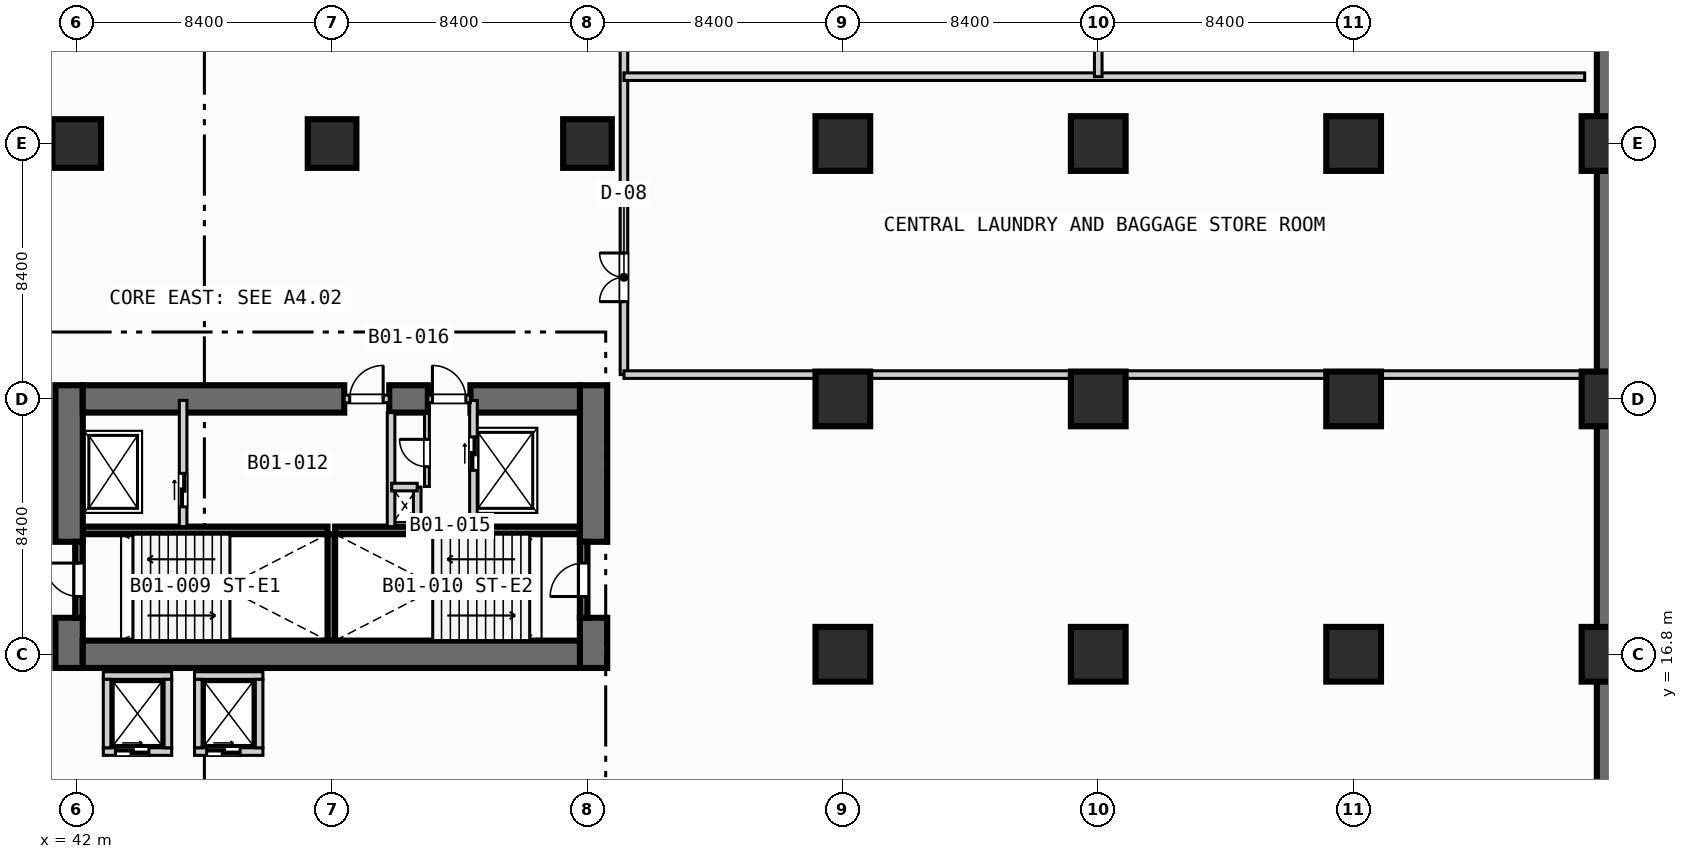
"""IFC4 building model, lengths in metres.
Left out: names, types, materials, properties, quantities, classifications, styles, units other than length and angle.
Written with IfcOpenShell. Run it as: python <this file> out.ifc"""

import sys

from ifc_helpers import new_model, si_unit, direction, frame, frame_2d, origin, origin_2d, place, context, subcontext, project, spatial, rectangle, extrude, element, fill, save


model = new_model("IFC4")
c1 = context("Model", 3, precision=1e-05, world=origin(), true_north=direction((0.0, 1.0)))
c2 = subcontext(c1, "Body", "Model", "MODEL_VIEW")
j1 = project(units=[si_unit("LENGTHUNIT", "METRE"), si_unit("PLANEANGLEUNIT", "RADIAN")], contexts=[c1])
p1 = place(None, origin())
s1 = spatial("IfcSite", under=j1, at=p1, CompositionType="ELEMENT")
p2 = place(p1, origin())
s2 = spatial("IfcBuilding", under=s1, at=p2, CompositionType="ELEMENT")
p3 = place(p2, frame((0.0, 0.0, -4.2)))
s3 = spatial("IfcBuildingStorey", under=s2, at=p3, CompositionType="ELEMENT", Elevation=-4.2)
p4 = place(p3, frame((92.4, 0.4, 0.0), z_axis=(0.0, 0.0, 1.0), x_axis=(0.0, 1.0, 0.0)))
e1 = element("IfcWall", 1, at=p4, inside=s3, PredefinedType="USERDEFINED", context=c2, shape_type="SweptSolid", body=[
    extrude(rectangle(XDim=91.6, YDim=0.8, at=frame_2d((45.8, 0.0))), origin(), (0.0, 0.0, 1.0), 3.62),
])
for number, where, z_axis, x_axis in (
    (2, (42.2, 20.875, 0.0), (0.0, 0.0, 1.0), (1.0, 0.0, 0.0)),
    (3, (50.5, 20.875, 0.0), (0.0, 0.0, 1.0), (1.0, 0.0, 0.0)),
):
    element("IfcWall", number, at=place(p3, frame(where, z_axis=z_axis, x_axis=x_axis)), inside=s3, PredefinedType="SOLIDWALL", context=c2, shape_type="SweptSolid", body=[
        extrude(rectangle(XDim=8.05, YDim=0.25, at=frame_2d((4.025, 0.0))), origin(), (0.0, 0.0, 1.0), 3.85),
    ])
p5 = place(p3, frame((50.375, 17.25, 0.0), z_axis=(0.0, 0.0, 1.0), x_axis=(0.0, 1.0, 0.0)))
e4 = element("IfcWall", 4, at=p5, inside=s3, PredefinedType="SOLIDWALL", context=c2, shape_type="SweptSolid", body=[
    extrude(rectangle(XDim=3.5, YDim=0.25, at=frame_2d((1.75, 0.0))), origin(), (0.0, 0.0, 1.0), 3.85),
])
p6 = place(p3, frame((41.75, 16.35, 0.0), z_axis=(0.0, 0.0, 1.0), x_axis=(0.0, 1.0, 0.0)))
e5 = element("IfcWall", 5, at=p6, inside=s3, PredefinedType="SHEAR", context=c2, shape_type="SweptSolid", body=[
    extrude(rectangle(XDim=1.65, YDim=0.9, at=frame_2d((0.825, 0.0))), origin(), (0.0, 0.0, 1.0), 3.85),
])
p7 = place(p3, frame((41.75, 20.5, 0.0), z_axis=(0.0, 0.0, 1.0), x_axis=(0.0, 1.0, 0.0)))
e6 = element("IfcWall", 6, at=p7, inside=s3, PredefinedType="SHEAR", context=c2, shape_type="SweptSolid", body=[
    extrude(rectangle(XDim=5.15, YDim=0.9, at=frame_2d((2.575, 0.0))), origin(), (0.0, 0.0, 1.0), 3.85),
])
p8 = place(p3, frame((59.0, 16.35, 0.0), z_axis=(0.0, 0.0, 1.0), x_axis=(0.0, 1.0, 0.0)))
e7 = element("IfcWall", 7, at=p8, inside=s3, PredefinedType="SHEAR", context=c2, shape_type="SweptSolid", body=[
    extrude(rectangle(XDim=1.65, YDim=0.9, at=frame_2d((0.825, 0.0))), origin(), (0.0, 0.0, 1.0), 3.85),
])
p9 = place(p3, frame((59.0, 20.5, 0.0), z_axis=(0.0, 0.0, 1.0), x_axis=(0.0, 1.0, 0.0)))
e8 = element("IfcWall", 8, at=p9, inside=s3, PredefinedType="SHEAR", context=c2, shape_type="SweptSolid", body=[
    extrude(rectangle(XDim=5.15, YDim=0.9, at=frame_2d((2.575, 0.0))), origin(), (0.0, 0.0, 1.0), 3.85),
])
p10 = place(p3, frame((42.2, 16.8, 0.0), z_axis=(0.0, 0.0, 1.0), x_axis=(1.0, 0.0, 0.0)))
e9 = element("IfcWall", 9, at=p10, inside=s3, PredefinedType="SHEAR", context=c2, shape_type="SweptSolid", body=[
    extrude(rectangle(XDim=16.35, YDim=0.9, at=frame_2d((8.175, 0.0))), origin(), (0.0, 0.0, 1.0), 3.85),
])
p11 = place(p3, frame((42.2, 25.2, 0.0), z_axis=(0.0, 0.0, 1.0), x_axis=(1.0, 0.0, 0.0)))
e10 = element("IfcWall", 10, at=p11, inside=s3, PredefinedType="SHEAR", context=c2, shape_type="SweptSolid", body=[
    extrude(rectangle(XDim=8.6, YDim=0.9, at=frame_2d((4.3, 0.0))), origin(), (0.0, 0.0, 1.0), 3.85),
])
p12 = place(p3, frame((52.28, 25.2, 0.0), z_axis=(0.0, 0.0, 1.0), x_axis=(1.0, 0.0, 0.0)))
e11 = element("IfcWall", 11, at=p12, inside=s3, PredefinedType="SHEAR", context=c2, shape_type="SweptSolid", body=[
    extrude(rectangle(XDim=1.27, YDim=0.9, at=frame_2d((0.635, 0.0))), origin(), (0.0, 0.0, 1.0), 3.85),
])
p13 = place(p3, frame((54.95, 25.2, 0.0), z_axis=(0.0, 0.0, 1.0), x_axis=(1.0, 0.0, 0.0)))
e12 = element("IfcWall", 12, at=p13, inside=s3, PredefinedType="SHEAR", context=c2, shape_type="SweptSolid", body=[
    extrude(rectangle(XDim=3.6, YDim=0.9, at=frame_2d((1.8, 0.0))), origin(), (0.0, 0.0, 1.0), 3.85),
])
for number, where, z_axis, x_axis in (
    (13, (42.0, 33.6, 0.0), (0.0, 0.0, 1.0), (1.0, 0.0, 0.0)),
    (14, (50.4, 33.6, 0.0), (0.0, 0.0, 1.0), (1.0, 0.0, 0.0)),
    (15, (58.8, 33.6, 0.0), (0.0, 0.0, 1.0), (1.0, 0.0, 0.0)),
):
    element("IfcColumn", number, at=place(p3, frame(where, z_axis=z_axis, x_axis=x_axis)), inside=s3, PredefinedType="COLUMN", context=c2, shape_type="SweptSolid", body=[
        extrude(rectangle(XDim=1.6, YDim=1.6, at=origin_2d()), origin(), (0.0, 0.0, 1.0), 4.2),
    ])
for number, where, z_axis, x_axis in (
    (16, (67.2, 16.8, 0.0), (0.0, 0.0, 1.0), (1.0, 0.0, 0.0)),
    (17, (67.2, 25.2, 0.0), (0.0, 0.0, 1.0), (1.0, 0.0, 0.0)),
    (18, (67.2, 33.6, 0.0), (0.0, 0.0, 1.0), (1.0, 0.0, 0.0)),
    (19, (75.6, 16.8, 0.0), (0.0, 0.0, 1.0), (1.0, 0.0, 0.0)),
    (20, (75.6, 25.2, 0.0), (0.0, 0.0, 1.0), (1.0, 0.0, 0.0)),
    (21, (75.6, 33.6, 0.0), (0.0, 0.0, 1.0), (1.0, 0.0, 0.0)),
    (22, (84.0, 16.8, 0.0), (0.0, 0.0, 1.0), (1.0, 0.0, 0.0)),
    (23, (84.0, 25.2, 0.0), (0.0, 0.0, 1.0), (1.0, 0.0, 0.0)),
    (24, (84.0, 33.6, 0.0), (0.0, 0.0, 1.0), (1.0, 0.0, 0.0)),
    (25, (92.4, 16.8, 0.0), (0.0, 0.0, 1.0), (1.0, 0.0, 0.0)),
    (26, (92.4, 25.2, 0.0), (0.0, 0.0, 1.0), (1.0, 0.0, 0.0)),
    (27, (92.4, 33.6, 0.0), (0.0, 0.0, 1.0), (1.0, 0.0, 0.0)),
):
    element("IfcColumn", number, at=place(p3, frame(where, z_axis=z_axis, x_axis=x_axis)), inside=s3, PredefinedType="COLUMN", context=c2, shape_type="SweptSolid", body=[
        extrude(rectangle(XDim=1.8, YDim=1.8, at=origin_2d()), origin(), (0.0, 0.0, 1.0), 4.2),
    ])
p14 = place(p3, frame((42.075, 18.0, 0.0), z_axis=(0.0, 0.0, 1.0), x_axis=(0.0, 1.0, 0.0)))
e28 = element("IfcWall", 28, at=p14, inside=s3, PredefinedType="SOLIDWALL", context=c2, shape_type="SweptSolid", body=[
    extrude(rectangle(XDim=2.5, YDim=0.25, at=frame_2d((1.25, 0.0))), origin(), (0.0, 0.0, 1.0), 3.85),
])
p15 = place(p14, frame((0.7, 0.0, 0.0)))
e29 = element("IfcOpeningElement", 29, at=p15, cuts=e28, PredefinedType="OPENING", context=c2, shape_type="SweptSolid", body=[
    extrude(rectangle(XDim=1.1, YDim=2.15, at=frame_2d((0.55, 1.075))), frame((0.0, 0.135, 0.0), z_axis=(0.0, -1.0, 0.0), x_axis=(1.0, 0.0, 0.0)), (0.0, 0.0, 1.0), 0.27),
])
p16 = place(p3, frame((58.675, 18.0, 0.0), z_axis=(0.0, 0.0, 1.0), x_axis=(0.0, 1.0, 0.0)))
e30 = element("IfcWall", 30, at=p16, inside=s3, PredefinedType="SOLIDWALL", context=c2, shape_type="SweptSolid", body=[
    extrude(rectangle(XDim=2.5, YDim=0.25, at=frame_2d((1.25, 0.0))), origin(), (0.0, 0.0, 1.0), 3.85),
])
p17 = place(p16, frame((0.7, 0.0, 0.0)))
e31 = element("IfcOpeningElement", 31, at=p17, cuts=e30, PredefinedType="OPENING", context=c2, shape_type="SweptSolid", body=[
    extrude(rectangle(XDim=1.1, YDim=2.15, at=frame_2d((0.55, 1.075))), frame((0.0, 0.135, 0.0), z_axis=(0.0, -1.0, 0.0), x_axis=(1.0, 0.0, 0.0)), (0.0, 0.0, 1.0), 0.27),
])
p18 = place(p3, frame((45.5, 21.0, 0.0), z_axis=(0.0, 0.0, 1.0), x_axis=(0.0, 1.0, 0.0)))
e32 = element("IfcWall", 32, at=p18, inside=s3, PredefinedType="SOLIDWALL", context=c2, shape_type="SweptSolid", body=[
    extrude(rectangle(XDim=4.15, YDim=0.25, at=frame_2d((2.075, 0.0))), origin(), (0.0, 0.0, 1.0), 3.85),
])
p19 = place(p18, frame((0.65, 0.0, 0.0)))
e33 = element("IfcOpeningElement", 33, at=p19, cuts=e32, PredefinedType="OPENING", context=c2, shape_type="SweptSolid", body=[
    extrude(rectangle(XDim=1.1, YDim=2.15, at=frame_2d((0.55, 1.075))), frame((0.0, 0.135, 0.0), z_axis=(0.0, -1.0, 0.0), x_axis=(1.0, 0.0, 0.0)), (0.0, 0.0, 1.0), 0.27),
])
p20 = place(p3, frame((50.8, 25.2, 0.0), z_axis=(0.0, 0.0, 1.0), x_axis=(1.0, 0.0, 0.0)))
e34 = element("IfcWall", 34, at=p20, inside=s3, PredefinedType="SOLIDWALL", context=c2, shape_type="SweptSolid", body=[
    extrude(rectangle(XDim=1.48, YDim=0.25, at=frame_2d((0.74, 0.0))), origin(), (0.0, 0.0, 1.0), 3.85),
])
p21 = place(p20, frame((0.18, 0.0, 0.0)))
e35 = element("IfcOpeningElement", 35, at=p21, cuts=e34, PredefinedType="OPENING", context=c2, shape_type="SweptSolid", body=[
    extrude(rectangle(XDim=1.1, YDim=2.15, at=frame_2d((0.55, 1.075))), frame((0.0, 0.135, 0.0), z_axis=(0.0, -1.0, 0.0), x_axis=(1.0, 0.0, 0.0)), (0.0, 0.0, 1.0), 0.27),
])
p22 = place(p3, frame((52.34, 21.0, 0.0), z_axis=(0.0, 0.0, 1.0), x_axis=(0.0, 1.0, 0.0)))
e36 = element("IfcWall", 36, at=p22, inside=s3, PredefinedType="SOLIDWALL", context=c2, shape_type="SweptSolid", body=[
    extrude(rectangle(XDim=3.75, YDim=0.25, at=frame_2d((1.875, 0.0))), origin(), (0.0, 0.0, 1.0), 3.85),
])
p23 = place(p3, frame((55.05, 21.0, 0.0), z_axis=(0.0, 0.0, 1.0), x_axis=(0.0, 1.0, 0.0)))
e37 = element("IfcWall", 37, at=p23, inside=s3, PredefinedType="SOLIDWALL", context=c2, shape_type="SweptSolid", body=[
    extrude(rectangle(XDim=4.15, YDim=0.25, at=frame_2d((2.075, 0.0))), origin(), (0.0, 0.0, 1.0), 3.85),
])
p24 = place(p23, frame((1.85, 0.0, 0.0)))
e38 = element("IfcOpeningElement", 38, at=p24, cuts=e37, PredefinedType="OPENING", context=c2, shape_type="SweptSolid", body=[
    extrude(rectangle(XDim=1.1, YDim=2.15, at=frame_2d((0.55, 1.075))), frame((0.0, 0.135, 0.0), z_axis=(0.0, -1.0, 0.0), x_axis=(1.0, 0.0, 0.0)), (0.0, 0.0, 1.0), 0.27),
])
p25 = place(p3, frame((53.55, 25.2, 0.0), z_axis=(0.0, 0.0, 1.0), x_axis=(1.0, 0.0, 0.0)))
e39 = element("IfcWall", 39, at=p25, inside=s3, PredefinedType="SOLIDWALL", context=c2, shape_type="SweptSolid", body=[
    extrude(rectangle(XDim=1.4, YDim=0.25, at=frame_2d((0.7, 0.0))), origin(), (0.0, 0.0, 1.0), 3.85),
])
p26 = place(p25, frame((0.15, 0.0, 0.0)))
e40 = element("IfcOpeningElement", 40, at=p26, cuts=e39, PredefinedType="OPENING", context=c2, shape_type="SweptSolid", body=[
    extrude(rectangle(XDim=1.1, YDim=2.15, at=frame_2d((0.55, 1.075))), frame((0.0, 0.135, 0.0), z_axis=(0.0, -1.0, 0.0), x_axis=(1.0, 0.0, 0.0)), (0.0, 0.0, 1.0), 0.27),
])
p27 = place(p3, frame((53.2, 21.0, 0.0), z_axis=(0.0, 0.0, 1.0), x_axis=(0.0, 1.0, 0.0)))
e41 = element("IfcWall", 41, at=p27, inside=s3, PredefinedType="SOLIDWALL", context=c2, shape_type="SweptSolid", body=[
    extrude(rectangle(XDim=1.3, YDim=0.25, at=frame_2d((0.65, 0.0))), origin(), (0.0, 0.0, 1.0), 3.85),
])
p28 = place(p3, frame((52.36, 22.3, 0.0), z_axis=(0.0, 0.0, 1.0), x_axis=(1.0, 0.0, 0.0)))
e42 = element("IfcWall", 42, at=p28, inside=s3, PredefinedType="SOLIDWALL", context=c2, shape_type="SweptSolid", body=[
    extrude(rectangle(XDim=0.84, YDim=0.25, at=frame_2d((0.42, 0.0))), origin(), (0.0, 0.0, 1.0), 3.85),
])
p29 = place(p3, frame((53.52, 22.32, 0.0), z_axis=(0.0, 0.0, 1.0), x_axis=(0.0, 1.0, 0.0)))
e43 = element("IfcWall", 43, at=p29, inside=s3, PredefinedType="PARTITIONING", context=c2, shape_type="SweptSolid", body=[
    extrude(rectangle(XDim=2.4, YDim=0.16, at=frame_2d((1.2, 0.0))), origin(), (0.0, 0.0, 1.0), 3.85),
])
p30 = place(p29, frame((0.65, 0.0, 0.0)))
e44 = element("IfcOpeningElement", 44, at=p30, cuts=e43, PredefinedType="OPENING", context=c2, shape_type="SweptSolid", body=[
    extrude(rectangle(XDim=0.9, YDim=2.1, at=frame_2d((0.45, 1.05))), frame((0.0, 0.09, 0.0), z_axis=(0.0, -1.0, 0.0), x_axis=(1.0, 0.0, 0.0)), (0.0, 0.0, 1.0), 0.18),
])
p31 = place(p3, frame((42.875, 13.6, 0.0), z_axis=(0.0, 0.0, 1.0), x_axis=(1.0, 0.0, 0.0)))
e45 = element("IfcWall", 45, at=p31, inside=s3, PredefinedType="SOLIDWALL", context=c2, shape_type="SweptSolid", body=[
    extrude(rectangle(XDim=2.25, YDim=0.25, at=frame_2d((1.125, 0.0))), origin(), (0.0, 0.0, 1.0), 3.85),
])
p32 = place(p31, frame((0.4, 0.0, 0.0)))
e46 = element("IfcOpeningElement", 46, at=p32, cuts=e45, PredefinedType="OPENING", context=c2, shape_type="SweptSolid", body=[
    extrude(rectangle(XDim=1.1, YDim=2.15, at=frame_2d((0.55, 1.075))), frame((0.0, 0.135, 0.0), z_axis=(0.0, -1.0, 0.0), x_axis=(1.0, 0.0, 0.0)), (0.0, 0.0, 1.0), 0.27),
])
for number, where, z_axis, x_axis in (
    (47, (42.875, 16.1, 0.0), (0.0, 0.0, 1.0), (1.0, 0.0, 0.0)),
    (48, (43.0, 13.725, 0.0), (0.0, 0.0, 1.0), (0.0, 1.0, 0.0)),
    (49, (45.0, 13.725, 0.0), (0.0, 0.0, 1.0), (0.0, 1.0, 0.0)),
):
    element("IfcWall", number, at=place(p3, frame(where, z_axis=z_axis, x_axis=x_axis)), inside=s3, PredefinedType="SOLIDWALL", context=c2, shape_type="SweptSolid", body=[
        extrude(rectangle(XDim=2.25, YDim=0.25, at=frame_2d((1.125, 0.0))), origin(), (0.0, 0.0, 1.0), 3.85),
    ])
p33 = place(p3, frame((45.875, 13.6, 0.0), z_axis=(0.0, 0.0, 1.0), x_axis=(1.0, 0.0, 0.0)))
e50 = element("IfcWall", 50, at=p33, inside=s3, PredefinedType="SOLIDWALL", context=c2, shape_type="SweptSolid", body=[
    extrude(rectangle(XDim=2.25, YDim=0.25, at=frame_2d((1.125, 0.0))), origin(), (0.0, 0.0, 1.0), 3.85),
])
p34 = place(p33, frame((0.4, 0.0, 0.0)))
e51 = element("IfcOpeningElement", 51, at=p34, cuts=e50, PredefinedType="OPENING", context=c2, shape_type="SweptSolid", body=[
    extrude(rectangle(XDim=1.1, YDim=2.15, at=frame_2d((0.55, 1.075))), frame((0.0, 0.135, 0.0), z_axis=(0.0, -1.0, 0.0), x_axis=(1.0, 0.0, 0.0)), (0.0, 0.0, 1.0), 0.27),
])
for number, where, z_axis, x_axis in (
    (52, (45.875, 16.1, 0.0), (0.0, 0.0, 1.0), (1.0, 0.0, 0.0)),
    (53, (46.0, 13.725, 0.0), (0.0, 0.0, 1.0), (0.0, 1.0, 0.0)),
    (54, (48.0, 13.725, 0.0), (0.0, 0.0, 1.0), (0.0, 1.0, 0.0)),
):
    element("IfcWall", number, at=place(p3, frame(where, z_axis=z_axis, x_axis=x_axis)), inside=s3, PredefinedType="SOLIDWALL", context=c2, shape_type="SweptSolid", body=[
        extrude(rectangle(XDim=2.25, YDim=0.25, at=frame_2d((1.125, 0.0))), origin(), (0.0, 0.0, 1.0), 3.85),
    ])
p35 = place(p3, frame((60.0, 26.0, 0.0), z_axis=(0.0, 0.0, 1.0), x_axis=(0.0, 1.0, 0.0)))
e55 = element("IfcWall", 55, at=p35, inside=s3, PredefinedType="SOLIDWALL", context=c2, shape_type="SweptSolid", body=[
    extrude(rectangle(XDim=19.6, YDim=0.25, at=frame_2d((9.8, 0.0))), origin(), (0.0, 0.0, 1.0), 3.85),
])
p36 = place(p35, frame((2.4, 0.0, 0.0)))
e56 = element("IfcOpeningElement", 56, at=p36, cuts=e55, PredefinedType="OPENING", context=c2, shape_type="SweptSolid", body=[
    extrude(rectangle(XDim=1.6, YDim=2.2, at=frame_2d((0.8, 1.1))), frame((0.0, 0.135, 0.0), z_axis=(0.0, -1.0, 0.0), x_axis=(1.0, 0.0, 0.0)), (0.0, 0.0, 1.0), 0.27),
])
p37 = place(p35, frame((17.2, 0.0, 0.0)))
e57 = element("IfcOpeningElement", 57, at=p37, cuts=e55, PredefinedType="OPENING", context=c2, shape_type="SweptSolid", body=[
    extrude(rectangle(XDim=1.6, YDim=2.2, at=frame_2d((0.8, 1.1))), frame((0.0, 0.135, 0.0), z_axis=(0.0, -1.0, 0.0), x_axis=(1.0, 0.0, 0.0)), (0.0, 0.0, 1.0), 0.27),
])
for number, where, z_axis, x_axis in (
    (58, (60.0, 35.8, 0.0), (0.0, 0.0, 1.0), (1.0, 0.0, 0.0)),
    (59, (60.0, 26.0, 0.0), (0.0, 0.0, 1.0), (1.0, 0.0, 0.0)),
):
    element("IfcWall", number, at=place(p3, frame(where, z_axis=z_axis, x_axis=x_axis)), inside=s3, PredefinedType="SOLIDWALL", context=c2, shape_type="SweptSolid", body=[
        extrude(rectangle(XDim=31.6, YDim=0.25, at=frame_2d((15.8, 0.0))), origin(), (0.0, 0.0, 1.0), 3.85),
    ])
p38 = place(p3, frame((75.6, 35.8, 0.0), z_axis=(0.0, 0.0, 1.0), x_axis=(0.0, 1.0, 0.0)))
e60 = element("IfcWall", 60, at=p38, inside=s3, PredefinedType="SOLIDWALL", context=c2, shape_type="SweptSolid", body=[
    extrude(rectangle(XDim=9.8, YDim=0.25, at=frame_2d((4.9, 0.0))), origin(), (0.0, 0.0, 1.0), 2.72),
])
p39 = place(p15, origin())
e61 = element("IfcDoor", 61, at=p39, inside=s3, OperationType="SINGLE_SWING_RIGHT", PredefinedType="DOOR", context=c2, shape_type="SweptSolid", body=[
    extrude(rectangle(XDim=1.1, YDim=2.15, at=frame_2d((0.55, 1.075))), frame((0.0, 0.025, 0.0), z_axis=(0.0, -1.0, 0.0), x_axis=(1.0, 0.0, 0.0)), (0.0, 0.0, 1.0), 0.05),
])
fill(e29, e61)
p40 = place(p17, origin())
e62 = element("IfcDoor", 62, at=p40, inside=s3, OperationType="SINGLE_SWING_LEFT", PredefinedType="DOOR", context=c2, shape_type="SweptSolid", body=[
    extrude(rectangle(XDim=1.1, YDim=2.15, at=frame_2d((0.55, 1.075))), frame((0.0, 0.025, 0.0), z_axis=(0.0, -1.0, 0.0), x_axis=(1.0, 0.0, 0.0)), (0.0, 0.0, 1.0), 0.05),
])
fill(e31, e62)
p41 = place(p19, origin())
e63 = element("IfcDoor", 63, at=p41, inside=s3, OperationType="SLIDING_TO_LEFT", PredefinedType="DOOR", context=c2, shape_type="SweptSolid", body=[
    extrude(rectangle(XDim=1.1, YDim=2.15, at=frame_2d((0.55, 1.075))), frame((0.0, 0.025, 0.0), z_axis=(0.0, -1.0, 0.0), x_axis=(1.0, 0.0, 0.0)), (0.0, 0.0, 1.0), 0.05),
])
fill(e33, e63)
p42 = place(p21, origin())
e64 = element("IfcDoor", 64, at=p42, inside=s3, OperationType="SINGLE_SWING_RIGHT", PredefinedType="DOOR", context=c2, shape_type="SweptSolid", body=[
    extrude(rectangle(XDim=1.1, YDim=2.15, at=frame_2d((0.55, 1.075))), frame((0.0, 0.025, 0.0), z_axis=(0.0, -1.0, 0.0), x_axis=(1.0, 0.0, 0.0)), (0.0, 0.0, 1.0), 0.05),
])
fill(e35, e64)
p43 = place(p24, origin())
e65 = element("IfcDoor", 65, at=p43, inside=s3, OperationType="SLIDING_TO_LEFT", PredefinedType="DOOR", context=c2, shape_type="SweptSolid", body=[
    extrude(rectangle(XDim=1.1, YDim=2.15, at=frame_2d((0.55, 1.075))), frame((0.0, 0.025, 0.0), z_axis=(0.0, -1.0, 0.0), x_axis=(1.0, 0.0, 0.0)), (0.0, 0.0, 1.0), 0.05),
])
fill(e38, e65)
p44 = place(p26, origin())
e66 = element("IfcDoor", 66, at=p44, inside=s3, OperationType="SINGLE_SWING_LEFT", PredefinedType="DOOR", context=c2, shape_type="SweptSolid", body=[
    extrude(rectangle(XDim=1.1, YDim=2.15, at=frame_2d((0.55, 1.075))), frame((0.0, 0.025, 0.0), z_axis=(0.0, -1.0, 0.0), x_axis=(1.0, 0.0, 0.0)), (0.0, 0.0, 1.0), 0.05),
])
fill(e40, e66)
p45 = place(p30, origin())
e67 = element("IfcDoor", 67, at=p45, inside=s3, OperationType="SINGLE_SWING_RIGHT", PredefinedType="DOOR", context=c2, shape_type="SweptSolid", body=[
    extrude(rectangle(XDim=0.9, YDim=2.1, at=frame_2d((0.45, 1.05))), frame((0.0, 0.025, 0.0), z_axis=(0.0, -1.0, 0.0), x_axis=(1.0, 0.0, 0.0)), (0.0, 0.0, 1.0), 0.05),
])
fill(e44, e67)
p46 = place(p32, origin())
e68 = element("IfcDoor", 68, at=p46, inside=s3, OperationType="SLIDING_TO_LEFT", PredefinedType="DOOR", context=c2, shape_type="SweptSolid", body=[
    extrude(rectangle(XDim=1.1, YDim=2.15, at=frame_2d((0.55, 1.075))), frame((0.0, 0.025, 0.0), z_axis=(0.0, -1.0, 0.0), x_axis=(1.0, 0.0, 0.0)), (0.0, 0.0, 1.0), 0.05),
])
fill(e46, e68)
p47 = place(p34, origin())
e69 = element("IfcDoor", 69, at=p47, inside=s3, OperationType="SLIDING_TO_LEFT", PredefinedType="DOOR", context=c2, shape_type="SweptSolid", body=[
    extrude(rectangle(XDim=1.1, YDim=2.15, at=frame_2d((0.55, 1.075))), frame((0.0, 0.025, 0.0), z_axis=(0.0, -1.0, 0.0), x_axis=(1.0, 0.0, 0.0)), (0.0, 0.0, 1.0), 0.05),
])
fill(e51, e69)
p48 = place(p36, origin())
e70 = element("IfcDoor", 70, at=p48, inside=s3, OperationType="SINGLE_SWING_LEFT", PredefinedType="DOOR", context=c2, shape_type="SweptSolid", body=[
    extrude(rectangle(XDim=1.6, YDim=2.2, at=frame_2d((0.8, 1.1))), frame((0.0, 0.025, 0.0), z_axis=(0.0, -1.0, 0.0), x_axis=(1.0, 0.0, 0.0)), (0.0, 0.0, 1.0), 0.05),
])
fill(e56, e70)
save(model, sys.argv[1])
